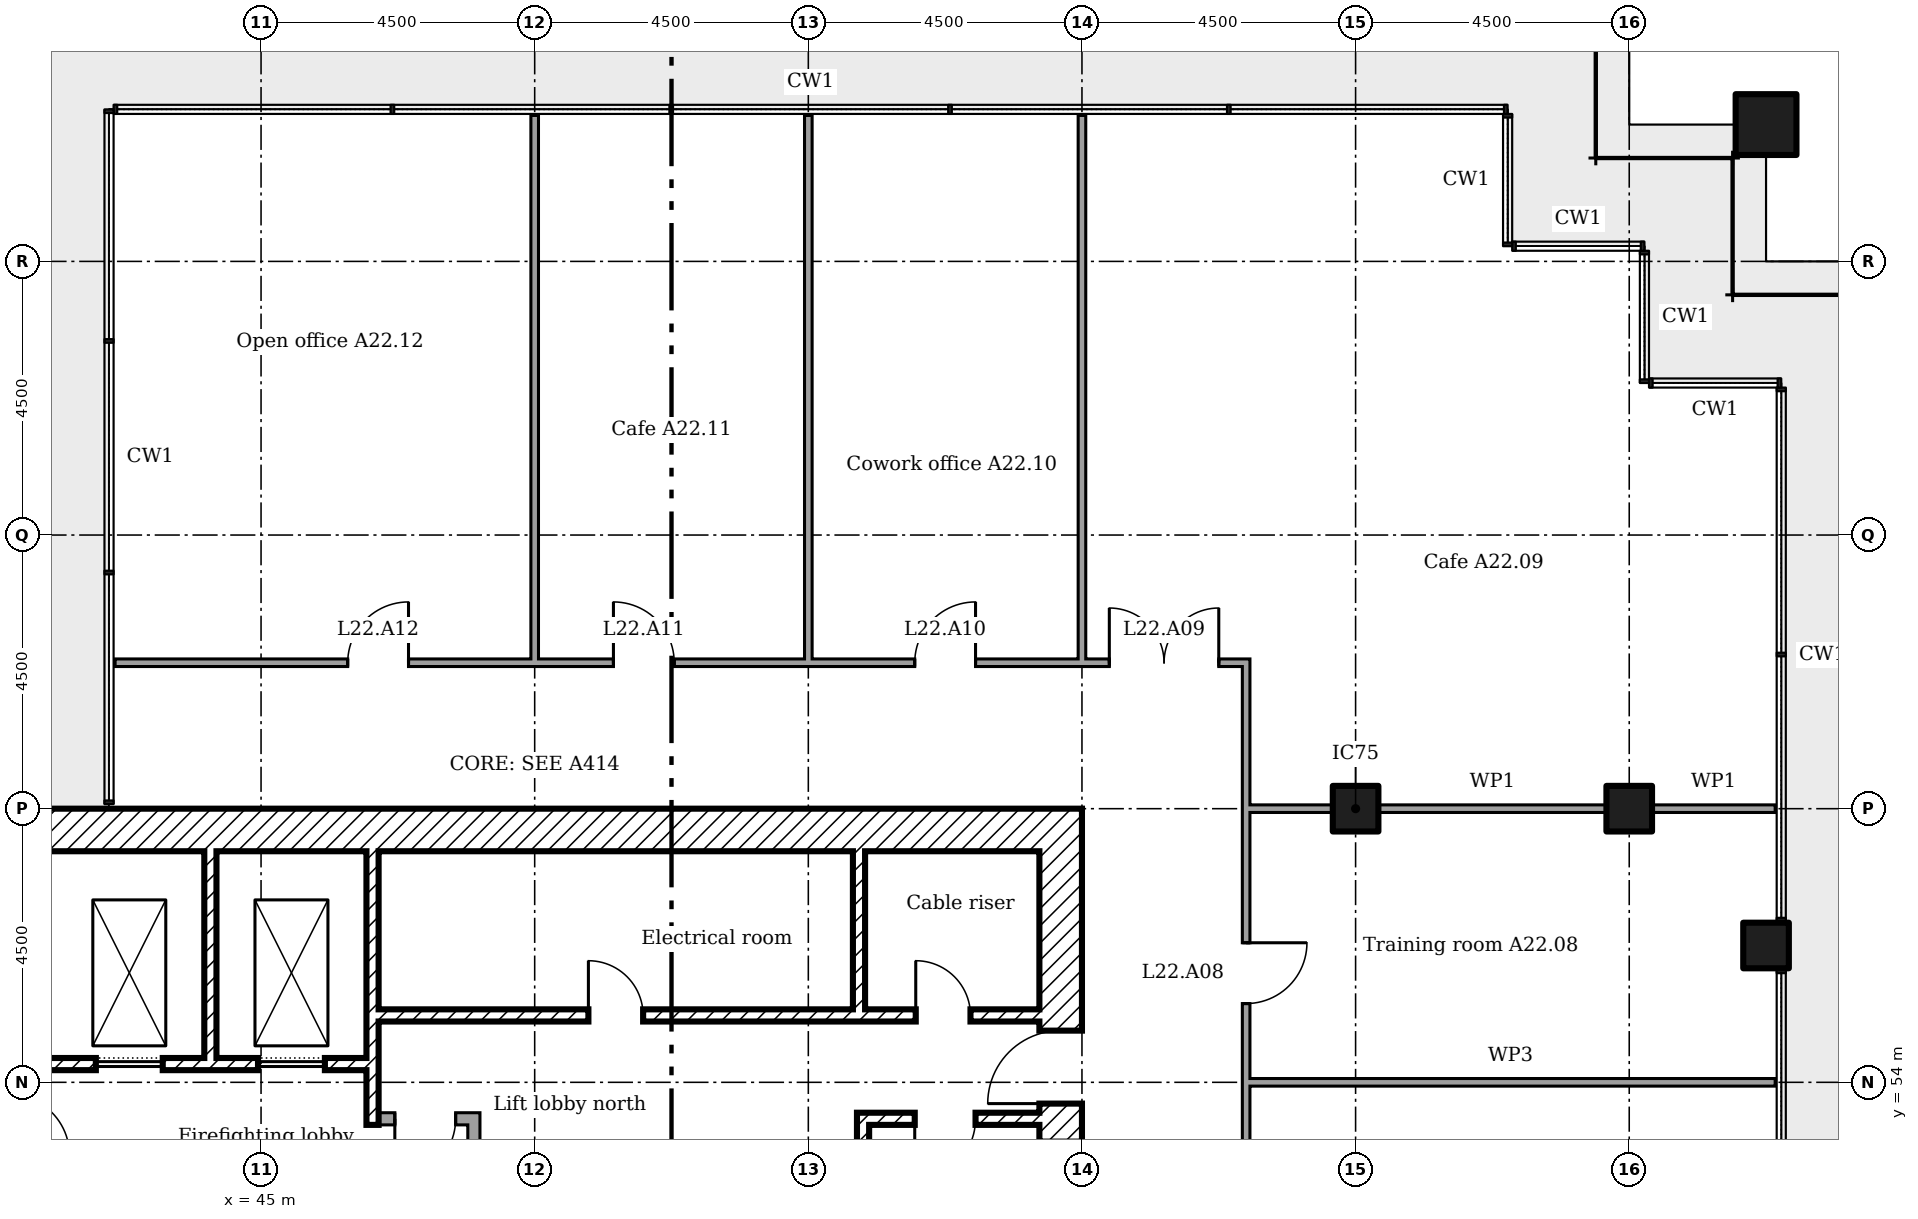
"""IFC4 building model, lengths in metres.
Left out: names, types, materials, properties, quantities, classifications, styles, units other than length and angle.
Written with IfcOpenShell. Run it as: python <this file> out.ifc"""

import sys

from ifc_helpers import new_model, si_unit, direction, frame, frame_2d, origin, origin_2d, place, context, subcontext, project, spatial, rectangle, extrude, element, fill, save


model = new_model("IFC4")
c1 = context("Model", 3, precision=1e-05, world=origin(), true_north=direction((0.0, 1.0)))
c2 = subcontext(c1, "Body", "Model", "MODEL_VIEW")
j1 = project(units=[si_unit("LENGTHUNIT", "METRE"), si_unit("PLANEANGLEUNIT", "RADIAN")], contexts=[c1])
p1 = place(None, origin())
s1 = spatial("IfcSite", under=j1, at=p1, CompositionType="ELEMENT")
p2 = place(p1, origin())
s2 = spatial("IfcBuilding", under=s1, at=p2, CompositionType="ELEMENT")
p3 = place(p2, frame((0.0, 0.0, 92.0)))
s3 = spatial("IfcBuildingStorey", under=s2, at=p3, CompositionType="ELEMENT", Elevation=92.0)
p4 = place(p3, frame((69.75, 69.75, 0.0)))
e1 = element("IfcColumn", 1, at=p4, inside=s3, PredefinedType="COLUMN", context=c2, shape_type="SweptSolid", body=[
    extrude(rectangle(XDim=1.0, YDim=1.0, at=origin_2d()), origin(), (0.0, 0.0, 1.0), 3.6),
])
for number, where in (
    (2, (63.0, 58.5, 0.0)),
    (3, (67.5, 58.5, 0.0)),
    (4, (69.75, 56.25, 0.0)),
):
    element("IfcColumn", number, at=place(p3, frame(where)), inside=s3, PredefinedType="COLUMN", context=c2, shape_type="SweptSolid", body=[
        extrude(rectangle(XDim=0.75, YDim=0.75, at=origin_2d()), origin(), (0.0, 0.0, 1.0), 3.6),
    ])
p5 = place(p3, frame((58.15, 40.5, 0.0), z_axis=(0.0, 0.0, 1.0), x_axis=(0.0, 1.0, 0.0)))
e5 = element("IfcWall", 5, at=p5, inside=s3, PredefinedType="SHEAR", context=c2, shape_type="SweptSolid", body=[
    extrude(rectangle(XDim=18.0, YDim=0.7, at=frame_2d((9.0, 0.0))), origin(), (0.0, 0.0, 1.0), 3.35),
])
p6 = place(p5, frame((13.15, 0.0, 0.0)))
e6 = element("IfcOpeningElement", 6, at=p6, cuts=e5, PredefinedType="OPENING", context=c2, shape_type="SweptSolid", body=[
    extrude(rectangle(XDim=1.2, YDim=2.1, at=frame_2d((0.6, 1.05))), frame((0.0, 0.36, 0.0), z_axis=(0.0, -1.0, 0.0), x_axis=(1.0, 0.0, 0.0)), (0.0, 0.0, 1.0), 0.72),
])
p7 = place(p5, frame((3.9, 0.0, 0.0)))
e7 = element("IfcOpeningElement", 7, at=p7, cuts=e5, PredefinedType="OPENING", context=c2, shape_type="SweptSolid", body=[
    extrude(rectangle(XDim=1.8, YDim=2.1, at=frame_2d((0.9, 1.05))), frame((0.0, 0.36, 0.0), z_axis=(0.0, -1.0, 0.0), x_axis=(1.0, 0.0, 0.0)), (0.0, 0.0, 1.0), 0.72),
])
p8 = place(p5, frame((11.525, 0.0, 0.0)))
e8 = element("IfcOpeningElement", 8, at=p8, cuts=e5, PredefinedType="OPENING", context=c2, shape_type="SweptSolid", body=[
    extrude(rectangle(XDim=1.0, YDim=2.1, at=frame_2d((0.5, 1.05))), frame((0.0, 0.36, 0.0), z_axis=(0.0, -1.0, 0.0), x_axis=(1.0, 0.0, 0.0)), (0.0, 0.0, 1.0), 0.72),
])
p9 = place(p3, frame((41.2, 58.15, 0.0)))
e9 = element("IfcWall", 9, at=p9, inside=s3, PredefinedType="SHEAR", context=c2, shape_type="SweptSolid", body=[
    extrude(rectangle(XDim=16.6, YDim=0.7, at=frame_2d((8.3, 0.0))), origin(), (0.0, 0.0, 1.0), 3.35),
])
p10 = place(p3, frame((44.167, 57.8, 0.0), z_axis=(0.0, 0.0, 1.0), x_axis=(0.0, -1.0, 0.0)))
e10 = element("IfcWall", 10, at=p10, inside=s3, PredefinedType="SHEAR", context=c2, shape_type="SweptSolid", body=[
    extrude(rectangle(XDim=3.4, YDim=0.2, at=frame_2d((1.7, 0.0))), origin(), (0.0, 0.0, 1.0), 3.35),
])
p11 = place(p3, frame((46.833, 57.8, 0.0), z_axis=(0.0, 0.0, 1.0), x_axis=(0.0, -1.0, 0.0)))
e11 = element("IfcWall", 11, at=p11, inside=s3, PredefinedType="SHEAR", context=c2, shape_type="SweptSolid", body=[
    extrude(rectangle(XDim=4.5, YDim=0.2, at=frame_2d((2.25, 0.0))), origin(), (0.0, 0.0, 1.0), 3.35),
])
p12 = place(p3, frame((54.833, 57.8, 0.0), z_axis=(0.0, 0.0, 1.0), x_axis=(0.0, -1.0, 0.0)))
e12 = element("IfcWall", 12, at=p12, inside=s3, PredefinedType="SHEAR", context=c2, shape_type="SweptSolid", body=[
    extrude(rectangle(XDim=2.6, YDim=0.2, at=frame_2d((1.3, 0.0))), origin(), (0.0, 0.0, 1.0), 3.35),
])
p13 = place(p3, frame((48.5, 51.9, 0.0), z_axis=(0.0, 0.0, 1.0), x_axis=(0.0, 1.0, 0.0)))
e13 = element("IfcWall", 13, at=p13, inside=s3, PredefinedType="PARTITIONING", context=c2, shape_type="SweptSolid", body=[
    extrude(rectangle(XDim=1.6, YDim=0.2, at=frame_2d((0.8, 0.0))), origin(), (0.0, 0.0, 1.0), 3.35),
])
p14 = place(p3, frame((46.933, 53.4, 0.0)))
e14 = element("IfcWall", 14, at=p14, inside=s3, PredefinedType="PARTITIONING", context=c2, shape_type="SweptSolid", body=[
    extrude(rectangle(XDim=1.467, YDim=0.2, at=frame_2d((0.733, 0.0))), origin(), (0.0, 0.0, 1.0), 3.35),
])
p15 = place(p14, frame((0.267, 0.0, 0.0)))
e15 = element("IfcOpeningElement", 15, at=p15, cuts=e14, PredefinedType="OPENING", context=c2, shape_type="SweptSolid", body=[
    extrude(rectangle(XDim=1.0, YDim=2.1, at=frame_2d((0.5, 1.05))), frame((0.0, 0.11, 0.0), z_axis=(0.0, -1.0, 0.0), x_axis=(1.0, 0.0, 0.0)), (0.0, 0.0, 1.0), 0.22),
])
p16 = place(p3, frame((46.933, 55.1, 0.0)))
e16 = element("IfcWall", 16, at=p16, inside=s3, PredefinedType="SHEAR", context=c2, shape_type="SweptSolid", body=[
    extrude(rectangle(XDim=10.867, YDim=0.2, at=frame_2d((5.433, 0.0))), origin(), (0.0, 0.0, 1.0), 3.35),
])
p17 = place(p16, frame((8.833, 0.0, 0.0)))
e17 = element("IfcOpeningElement", 17, at=p17, cuts=e16, PredefinedType="OPENING", context=c2, shape_type="SweptSolid", body=[
    extrude(rectangle(XDim=0.9, YDim=2.1, at=frame_2d((0.45, 1.05))), frame((0.0, 0.11, 0.0), z_axis=(0.0, -1.0, 0.0), x_axis=(1.0, 0.0, 0.0)), (0.0, 0.0, 1.0), 0.22),
])
p18 = place(p16, frame((3.45, 0.0, 0.0)))
e18 = element("IfcOpeningElement", 18, at=p18, cuts=e16, PredefinedType="OPENING", context=c2, shape_type="SweptSolid", body=[
    extrude(rectangle(XDim=0.9, YDim=2.1, at=frame_2d((0.45, 1.05))), frame((0.0, 0.11, 0.0), z_axis=(0.0, -1.0, 0.0), x_axis=(1.0, 0.0, 0.0)), (0.0, 0.0, 1.0), 0.22),
])
p19 = place(p3, frame((41.2, 54.3, 0.0)))
e19 = element("IfcWall", 19, at=p19, inside=s3, PredefinedType="SHEAR", context=c2, shape_type="SweptSolid", body=[
    extrude(rectangle(XDim=5.533, YDim=0.2, at=frame_2d((2.767, 0.0))), origin(), (0.0, 0.0, 1.0), 3.35),
])
p20 = place(p19, frame((1.083, 0.0, 0.0)))
e20 = element("IfcOpeningElement", 20, at=p20, cuts=e19, PredefinedType="OPENING", context=c2, shape_type="SweptSolid", body=[
    extrude(rectangle(XDim=1.1, YDim=2.1, at=frame_2d((0.55, 1.05))), frame((0.0, 0.11, 0.0), z_axis=(0.0, -1.0, 0.0), x_axis=(1.0, 0.0, 0.0)), (0.0, 0.0, 1.0), 0.22),
])
p21 = place(p19, frame((3.75, 0.0, 0.0)))
e21 = element("IfcOpeningElement", 21, at=p21, cuts=e19, PredefinedType="OPENING", context=c2, shape_type="SweptSolid", body=[
    extrude(rectangle(XDim=1.1, YDim=2.1, at=frame_2d((0.55, 1.05))), frame((0.0, 0.11, 0.0), z_axis=(0.0, -1.0, 0.0), x_axis=(1.0, 0.0, 0.0)), (0.0, 0.0, 1.0), 0.22),
])
p22 = place(p3, frame((54.8, 53.4, 0.0)))
e22 = element("IfcWall", 22, at=p22, inside=s3, PredefinedType="SHEAR", context=c2, shape_type="SweptSolid", body=[
    extrude(rectangle(XDim=3.0, YDim=0.2, at=frame_2d((1.5, 0.0))), origin(), (0.0, 0.0, 1.0), 3.35),
])
p23 = place(p22, frame((0.95, 0.0, 0.0)))
e23 = element("IfcOpeningElement", 23, at=p23, cuts=e22, PredefinedType="OPENING", context=c2, shape_type="SweptSolid", body=[
    extrude(rectangle(XDim=1.0, YDim=2.1, at=frame_2d((0.5, 1.05))), frame((0.0, 0.11, 0.0), z_axis=(0.0, -1.0, 0.0), x_axis=(1.0, 0.0, 0.0)), (0.0, 0.0, 1.0), 0.22),
])
p24 = place(p3, frame((54.9, 46.8, 0.0), z_axis=(0.0, 0.0, 1.0), x_axis=(0.0, 1.0, 0.0)))
e24 = element("IfcWall", 24, at=p24, inside=s3, PredefinedType="SHEAR", context=c2, shape_type="SweptSolid", body=[
    extrude(rectangle(XDim=6.5, YDim=0.2, at=frame_2d((3.25, 0.0))), origin(), (0.0, 0.0, 1.0), 3.35),
])
p25 = place(p3, frame((61.2, 54.0, 0.0)))
e25 = element("IfcWall", 25, at=p25, inside=s3, PredefinedType="MOVABLE", context=c2, shape_type="SweptSolid", body=[
    extrude(rectangle(XDim=8.7, YDim=0.125, at=frame_2d((4.35, 0.0))), origin(), (0.0, 0.0, 1.0), 2.766),
])
p26 = place(p3, frame((61.2, 58.5, 0.0)))
e26 = element("IfcWall", 26, at=p26, inside=s3, PredefinedType="PARTITIONING", context=c2, shape_type="SweptSolid", body=[
    extrude(rectangle(XDim=1.425, YDim=0.125, at=frame_2d((0.712, 0.0))), origin(), (0.0, 0.0, 1.0), 2.676),
])
p27 = place(p3, frame((63.375, 58.5, 0.0)))
e27 = element("IfcWall", 27, at=p27, inside=s3, PredefinedType="PARTITIONING", context=c2, shape_type="SweptSolid", body=[
    extrude(rectangle(XDim=3.75, YDim=0.125, at=frame_2d((1.875, 0.0))), origin(), (0.0, 0.0, 1.0), 2.676),
])
p28 = place(p3, frame((67.875, 58.5, 0.0)))
e28 = element("IfcWall", 28, at=p28, inside=s3, PredefinedType="PARTITIONING", context=c2, shape_type="SweptSolid", body=[
    extrude(rectangle(XDim=2.025, YDim=0.125, at=frame_2d((1.012, 0.0))), origin(), (0.0, 0.0, 1.0), 2.676),
])
p29 = place(p3, frame((42.6, 60.9, 0.0)))
e29 = element("IfcWall", 29, at=p29, inside=s3, PredefinedType="PARTITIONING", context=c2, shape_type="SweptSolid", body=[
    extrude(rectangle(XDim=18.662, YDim=0.125, at=frame_2d((9.331, 0.0))), origin(), (0.0, 0.0, 1.0), 3.45),
])
p30 = place(p29, frame((16.35, 0.0, 0.0)))
e30 = element("IfcOpeningElement", 30, at=p30, cuts=e29, PredefinedType="OPENING", context=c2, shape_type="SweptSolid", body=[
    extrude(rectangle(XDim=1.8, YDim=2.1, at=frame_2d((0.9, 1.05))), frame((0.0, 0.073, 0.0), z_axis=(0.0, -1.0, 0.0), x_axis=(1.0, 0.0, 0.0)), (0.0, 0.0, 1.0), 0.145),
])
p31 = place(p29, frame((13.15, 0.0, 0.0)))
e31 = element("IfcOpeningElement", 31, at=p31, cuts=e29, PredefinedType="OPENING", context=c2, shape_type="SweptSolid", body=[
    extrude(rectangle(XDim=1.0, YDim=2.1, at=frame_2d((0.5, 1.05))), frame((0.0, 0.073, 0.0), z_axis=(0.0, -1.0, 0.0), x_axis=(1.0, 0.0, 0.0)), (0.0, 0.0, 1.0), 0.145),
])
p32 = place(p29, frame((8.195, 0.0, 0.0)))
e32 = element("IfcOpeningElement", 32, at=p32, cuts=e29, PredefinedType="OPENING", context=c2, shape_type="SweptSolid", body=[
    extrude(rectangle(XDim=1.0, YDim=2.1, at=frame_2d((0.5, 1.05))), frame((0.0, 0.073, 0.0), z_axis=(0.0, -1.0, 0.0), x_axis=(1.0, 0.0, 0.0)), (0.0, 0.0, 1.0), 0.145),
])
p33 = place(p29, frame((3.825, 0.0, 0.0)))
e33 = element("IfcOpeningElement", 33, at=p33, cuts=e29, PredefinedType="OPENING", context=c2, shape_type="SweptSolid", body=[
    extrude(rectangle(XDim=1.0, YDim=2.1, at=frame_2d((0.5, 1.05))), frame((0.0, 0.073, 0.0), z_axis=(0.0, -1.0, 0.0), x_axis=(1.0, 0.0, 0.0)), (0.0, 0.0, 1.0), 0.145),
])
for number, where, z_axis, x_axis in (
    (34, (49.5, 60.9, 0.0), (0.0, 0.0, 1.0), (0.0, 1.0, 0.0)),
    (35, (54.0, 60.9, 0.0), (0.0, 0.0, 1.0), (0.0, 1.0, 0.0)),
    (36, (58.5, 60.9, 0.0), (0.0, 0.0, 1.0), (0.0, 1.0, 0.0)),
):
    element("IfcWall", number, at=place(p3, frame(where, z_axis=z_axis, x_axis=x_axis)), inside=s3, PredefinedType="PARTITIONING", context=c2, shape_type="SweptSolid", body=[
        extrude(rectangle(XDim=9.0, YDim=0.125, at=frame_2d((4.5, 0.0))), origin(), (0.0, 0.0, 1.0), 2.766),
    ])
p34 = place(p3, frame((61.2, 38.163, 0.0), z_axis=(0.0, 0.0, 1.0), x_axis=(0.0, 1.0, 0.0)))
e37 = element("IfcWall", 37, at=p34, inside=s3, PredefinedType="PARTITIONING", context=c2, shape_type="SweptSolid", body=[
    extrude(rectangle(XDim=22.675, YDim=0.125, at=frame_2d((11.337, 0.0))), origin(), (0.0, 0.0, 1.0), 3.45),
])
p35 = place(p34, frame((3.633, 0.0, 0.0)))
e38 = element("IfcOpeningElement", 38, at=p35, cuts=e37, PredefinedType="OPENING", context=c2, shape_type="SweptSolid", body=[
    extrude(rectangle(XDim=1.0, YDim=2.1, at=frame_2d((0.5, 1.05))), frame((0.0, 0.073, 0.0), z_axis=(0.0, -1.0, 0.0), x_axis=(1.0, 0.0, 0.0)), (0.0, 0.0, 1.0), 0.145),
])
p36 = place(p34, frame((9.042, 0.0, 0.0)))
e39 = element("IfcOpeningElement", 39, at=p36, cuts=e37, PredefinedType="OPENING", context=c2, shape_type="SweptSolid", body=[
    extrude(rectangle(XDim=1.0, YDim=2.1, at=frame_2d((0.5, 1.05))), frame((0.0, 0.073, 0.0), z_axis=(0.0, -1.0, 0.0), x_axis=(1.0, 0.0, 0.0)), (0.0, 0.0, 1.0), 0.145),
])
p37 = place(p34, frame((13.087, 0.0, 0.0)))
e40 = element("IfcOpeningElement", 40, at=p37, cuts=e37, PredefinedType="OPENING", context=c2, shape_type="SweptSolid", body=[
    extrude(rectangle(XDim=1.0, YDim=2.1, at=frame_2d((0.5, 1.05))), frame((0.0, 0.073, 0.0), z_axis=(0.0, -1.0, 0.0), x_axis=(1.0, 0.0, 0.0)), (0.0, 0.0, 1.0), 0.145),
])
p38 = place(p34, frame((17.133, 0.0, 0.0)))
e41 = element("IfcOpeningElement", 41, at=p38, cuts=e37, PredefinedType="OPENING", context=c2, shape_type="SweptSolid", body=[
    extrude(rectangle(XDim=1.0, YDim=2.1, at=frame_2d((0.5, 1.05))), frame((0.0, 0.073, 0.0), z_axis=(0.0, -1.0, 0.0), x_axis=(1.0, 0.0, 0.0)), (0.0, 0.0, 1.0), 0.145),
])
p39 = place(p6, origin())
e42 = element("IfcDoor", 42, at=p39, inside=s3, OperationType="SINGLE_SWING_RIGHT", PredefinedType="DOOR", context=c2, shape_type="SweptSolid", body=[
    extrude(rectangle(XDim=1.2, YDim=2.1, at=frame_2d((0.6, 1.05))), frame((0.0, 0.025, 0.0), z_axis=(0.0, -1.0, 0.0), x_axis=(1.0, 0.0, 0.0)), (0.0, 0.0, 1.0), 0.05),
])
fill(e6, e42)
p40 = place(p23, frame((1.0, 0.0, 0.0), x_axis=(-1.0, 0.0, 0.0)))
e43 = element("IfcDoor", 43, at=p40, inside=s3, OperationType="SINGLE_SWING_LEFT", PredefinedType="DOOR", context=c2, shape_type="SweptSolid", body=[
    extrude(rectangle(XDim=1.0, YDim=2.1, at=frame_2d((0.5, 1.05))), frame((0.0, 0.025, 0.0), z_axis=(0.0, -1.0, 0.0), x_axis=(1.0, 0.0, 0.0)), (0.0, 0.0, 1.0), 0.05),
])
fill(e23, e43)
p41 = place(p15, frame((1.0, 0.0, 0.0), x_axis=(-1.0, 0.0, 0.0)))
e44 = element("IfcDoor", 44, at=p41, inside=s3, OperationType="SINGLE_SWING_LEFT", PredefinedType="DOOR", context=c2, shape_type="SweptSolid", body=[
    extrude(rectangle(XDim=1.0, YDim=2.1, at=frame_2d((0.5, 1.05))), frame((0.0, 0.025, 0.0), z_axis=(0.0, -1.0, 0.0), x_axis=(1.0, 0.0, 0.0)), (0.0, 0.0, 1.0), 0.05),
])
fill(e15, e44)
p42 = place(p17, origin())
e45 = element("IfcDoor", 45, at=p42, inside=s3, OperationType="SINGLE_SWING_RIGHT", PredefinedType="DOOR", context=c2, shape_type="SweptSolid", body=[
    extrude(rectangle(XDim=0.9, YDim=2.1, at=frame_2d((0.45, 1.05))), frame((0.0, 0.025, 0.0), z_axis=(0.0, -1.0, 0.0), x_axis=(1.0, 0.0, 0.0)), (0.0, 0.0, 1.0), 0.05),
])
fill(e17, e45)
p43 = place(p18, origin())
e46 = element("IfcDoor", 46, at=p43, inside=s3, OperationType="SINGLE_SWING_RIGHT", PredefinedType="DOOR", context=c2, shape_type="SweptSolid", body=[
    extrude(rectangle(XDim=0.9, YDim=2.1, at=frame_2d((0.45, 1.05))), frame((0.0, 0.025, 0.0), z_axis=(0.0, -1.0, 0.0), x_axis=(1.0, 0.0, 0.0)), (0.0, 0.0, 1.0), 0.05),
])
fill(e18, e46)
p44 = place(p20, origin())
e47 = element("IfcDoor", 47, at=p44, inside=s3, OperationType="SLIDING_TO_LEFT", PredefinedType="DOOR", context=c2, shape_type="SweptSolid", body=[
    extrude(rectangle(XDim=1.1, YDim=2.1, at=frame_2d((0.55, 1.05))), frame((0.0, 0.025, 0.0), z_axis=(0.0, -1.0, 0.0), x_axis=(1.0, 0.0, 0.0)), (0.0, 0.0, 1.0), 0.05),
])
fill(e20, e47)
p45 = place(p21, origin())
e48 = element("IfcDoor", 48, at=p45, inside=s3, OperationType="SLIDING_TO_LEFT", PredefinedType="DOOR", context=c2, shape_type="SweptSolid", body=[
    extrude(rectangle(XDim=1.1, YDim=2.1, at=frame_2d((0.55, 1.05))), frame((0.0, 0.025, 0.0), z_axis=(0.0, -1.0, 0.0), x_axis=(1.0, 0.0, 0.0)), (0.0, 0.0, 1.0), 0.05),
])
fill(e21, e48)
p46 = place(p38, frame((1.0, 0.0, 0.0), x_axis=(-1.0, 0.0, 0.0)))
e49 = element("IfcDoor", 49, at=p46, inside=s3, OperationType="SINGLE_SWING_RIGHT", PredefinedType="DOOR", context=c2, shape_type="SweptSolid", body=[
    extrude(rectangle(XDim=1.0, YDim=2.1, at=frame_2d((0.5, 1.05))), frame((0.0, 0.025, 0.0), z_axis=(0.0, -1.0, 0.0), x_axis=(1.0, 0.0, 0.0)), (0.0, 0.0, 1.0), 0.05),
])
fill(e41, e49)
p47 = place(p30, origin())
e50 = element("IfcDoor", 50, at=p47, inside=s3, OperationType="DOUBLE_DOOR_SINGLE_SWING", PredefinedType="DOOR", context=c2, shape_type="SweptSolid", body=[
    extrude(rectangle(XDim=1.8, YDim=2.1, at=frame_2d((0.9, 1.05))), frame((0.0, 0.025, 0.0), z_axis=(0.0, -1.0, 0.0), x_axis=(1.0, 0.0, 0.0)), (0.0, 0.0, 1.0), 0.05),
])
fill(e30, e50)
p48 = place(p31, origin())
e51 = element("IfcDoor", 51, at=p48, inside=s3, OperationType="SINGLE_SWING_LEFT", PredefinedType="DOOR", context=c2, shape_type="SweptSolid", body=[
    extrude(rectangle(XDim=1.0, YDim=2.1, at=frame_2d((0.5, 1.05))), frame((0.0, 0.025, 0.0), z_axis=(0.0, -1.0, 0.0), x_axis=(1.0, 0.0, 0.0)), (0.0, 0.0, 1.0), 0.05),
])
fill(e31, e51)
p49 = place(p32, origin())
e52 = element("IfcDoor", 52, at=p49, inside=s3, OperationType="SINGLE_SWING_RIGHT", PredefinedType="DOOR", context=c2, shape_type="SweptSolid", body=[
    extrude(rectangle(XDim=1.0, YDim=2.1, at=frame_2d((0.5, 1.05))), frame((0.0, 0.025, 0.0), z_axis=(0.0, -1.0, 0.0), x_axis=(1.0, 0.0, 0.0)), (0.0, 0.0, 1.0), 0.05),
])
fill(e32, e52)
p50 = place(p33, origin())
e53 = element("IfcDoor", 53, at=p50, inside=s3, OperationType="SINGLE_SWING_LEFT", PredefinedType="DOOR", context=c2, shape_type="SweptSolid", body=[
    extrude(rectangle(XDim=1.0, YDim=2.1, at=frame_2d((0.5, 1.05))), frame((0.0, 0.025, 0.0), z_axis=(0.0, -1.0, 0.0), x_axis=(1.0, 0.0, 0.0)), (0.0, 0.0, 1.0), 0.05),
])
fill(e33, e53)
save(model, sys.argv[1])
